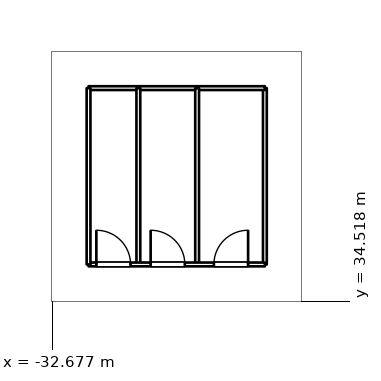
"""IFC4 building model, lengths in metres.
Left out: names, types, materials, properties, quantities, classifications, styles, units other than length and angle.
Written with IfcOpenShell. Run it as: python <this file> out.ifc"""

import sys

from ifc_helpers import new_model, si_unit, direction, frame, frame_2d, origin, place, context, subcontext, project, spatial, rectangle, extrude, element, fill, save


model = new_model("IFC4")
c1 = context("Model", 3, precision=1e-05, world=origin(), true_north=direction((0.0, 1.0)))
c2 = subcontext(c1, "Body", "Model", "MODEL_VIEW")
j1 = project(units=[si_unit("LENGTHUNIT", "METRE"), si_unit("PLANEANGLEUNIT", "RADIAN")], contexts=[c1])
p1 = place(None, origin())
s1 = spatial("IfcSite", under=j1, at=p1, CompositionType="ELEMENT")
p2 = place(p1, origin())
s2 = spatial("IfcBuilding", under=s1, at=p2, CompositionType="ELEMENT")
p3 = place(p2, frame((0.0, 0.0, 6.0)))
s3 = spatial("IfcBuildingStorey", under=s2, at=p3, CompositionType="ELEMENT", Elevation=6.0)
p4 = place(p3, frame((-31.72, 35.48, 0.0), z_axis=(0.0, 0.0, 1.0), x_axis=(1.0, 0.0, 0.0)))
e1 = element("IfcWall", 1, at=p4, inside=s3, PredefinedType="PARTITIONING", context=c2, shape_type="SweptSolid", body=[
    extrude(rectangle(XDim=4.64, YDim=0.1, at=frame_2d((2.32, 0.0))), origin(), (0.0, 0.0, 1.0), 4.7),
])
p5 = place(p4, frame((0.205, 0.0, 0.0)))
e2 = element("IfcOpeningElement", 2, at=p5, cuts=e1, PredefinedType="OPENING", context=c2, shape_type="SweptSolid", body=[
    extrude(rectangle(XDim=0.9, YDim=2.1, at=frame_2d((0.45, 1.05))), frame((0.0, 0.06, 0.0), z_axis=(0.0, -1.0, 0.0), x_axis=(1.0, 0.0, 0.0)), (0.0, 0.0, 1.0), 0.12),
])
p6 = place(p4, frame((1.634, 0.0, 0.0)))
e3 = element("IfcOpeningElement", 3, at=p6, cuts=e1, PredefinedType="OPENING", context=c2, shape_type="SweptSolid", body=[
    extrude(rectangle(XDim=0.9, YDim=2.1, at=frame_2d((0.45, 1.05))), frame((0.0, 0.06, 0.0), z_axis=(0.0, -1.0, 0.0), x_axis=(1.0, 0.0, 0.0)), (0.0, 0.0, 1.0), 0.12),
])
p7 = place(p4, frame((3.299, 0.0, 0.0)))
e4 = element("IfcOpeningElement", 4, at=p7, cuts=e1, PredefinedType="OPENING", context=c2, shape_type="SweptSolid", body=[
    extrude(rectangle(XDim=0.9, YDim=2.1, at=frame_2d((0.45, 1.05))), frame((0.0, 0.06, 0.0), z_axis=(0.0, -1.0, 0.0), x_axis=(1.0, 0.0, 0.0)), (0.0, 0.0, 1.0), 0.12),
])
p8 = place(p3, frame((-27.08, 35.48, 0.0), z_axis=(0.0, 0.0, 1.0), x_axis=(0.0, 1.0, 0.0)))
e5 = element("IfcWall", 5, at=p8, inside=s3, PredefinedType="PARTITIONING", context=c2, shape_type="SweptSolid", body=[
    extrude(rectangle(XDim=4.64, YDim=0.1, at=frame_2d((2.32, 0.0))), origin(), (0.0, 0.0, 1.0), 4.7),
])
p9 = place(p3, frame((-27.08, 40.12, 0.0), z_axis=(0.0, 0.0, 1.0), x_axis=(-1.0, 0.0, 0.0)))
e6 = element("IfcWall", 6, at=p9, inside=s3, PredefinedType="PARTITIONING", context=c2, shape_type="SweptSolid", body=[
    extrude(rectangle(XDim=4.64, YDim=0.1, at=frame_2d((2.32, 0.0))), origin(), (0.0, 0.0, 1.0), 4.7),
])
for number, where, z_axis, x_axis in (
    (7, (-31.72, 40.12, 0.0), (0.0, 0.0, 1.0), (0.0, -1.0, 0.0)),
    (8, (-30.409, 35.48, 0.0), (0.0, 0.0, 1.0), (0.0, 1.0, 0.0)),
    (9, (-28.863, 35.48, 0.0), (0.0, 0.0, 1.0), (0.0, 1.0, 0.0)),
):
    element("IfcWall", number, at=place(p3, frame(where, z_axis=z_axis, x_axis=x_axis)), inside=s3, PredefinedType="PARTITIONING", context=c2, shape_type="SweptSolid", body=[
        extrude(rectangle(XDim=4.64, YDim=0.1, at=frame_2d((2.32, 0.0))), origin(), (0.0, 0.0, 1.0), 4.7),
    ])
p10 = place(p5, origin())
e10 = element("IfcDoor", 10, at=p10, inside=s3, OperationType="SINGLE_SWING_LEFT", PredefinedType="DOOR", context=c2, shape_type="SweptSolid", body=[
    extrude(rectangle(XDim=0.9, YDim=2.1, at=frame_2d((0.45, 1.05))), frame((0.0, 0.025, 0.0), z_axis=(0.0, -1.0, 0.0), x_axis=(1.0, 0.0, 0.0)), (0.0, 0.0, 1.0), 0.05),
])
fill(e2, e10)
p11 = place(p6, origin())
e11 = element("IfcDoor", 11, at=p11, inside=s3, OperationType="SINGLE_SWING_LEFT", PredefinedType="DOOR", context=c2, shape_type="SweptSolid", body=[
    extrude(rectangle(XDim=0.9, YDim=2.1, at=frame_2d((0.45, 1.05))), frame((0.0, 0.025, 0.0), z_axis=(0.0, -1.0, 0.0), x_axis=(1.0, 0.0, 0.0)), (0.0, 0.0, 1.0), 0.05),
])
fill(e3, e11)
p12 = place(p7, origin())
e12 = element("IfcDoor", 12, at=p12, inside=s3, OperationType="SINGLE_SWING_RIGHT", PredefinedType="DOOR", context=c2, shape_type="SweptSolid", body=[
    extrude(rectangle(XDim=0.9, YDim=2.1, at=frame_2d((0.45, 1.05))), frame((0.0, 0.025, 0.0), z_axis=(0.0, -1.0, 0.0), x_axis=(1.0, 0.0, 0.0)), (0.0, 0.0, 1.0), 0.05),
])
fill(e4, e12)
save(model, sys.argv[1])
